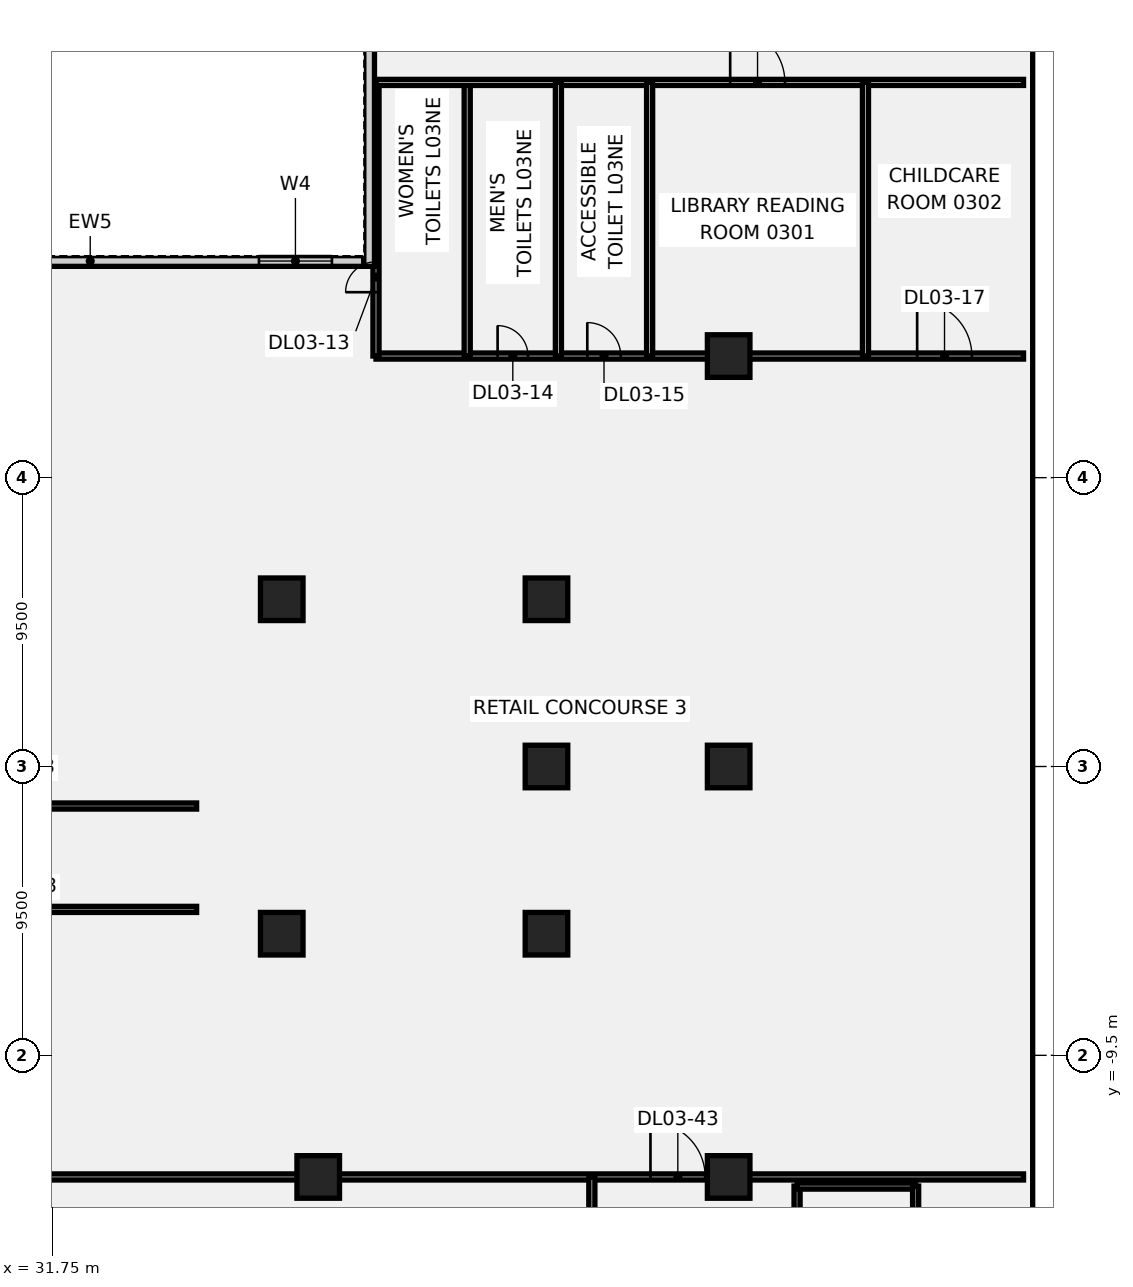
"""IFC4 building model, lengths in metres.
Left out: names, types, materials, properties, quantities, classifications, styles, units other than length and angle.
Written with IfcOpenShell. Run it as: python <this file> out.ifc"""

import sys

from ifc_helpers import new_model, si_unit, direction, frame, frame_2d, origin, origin_2d, place, context, subcontext, project, spatial, polyline, rectangle, outline, extrude, element, fill, save


model = new_model("IFC4")
c1 = context("Model", 3, precision=1e-05, world=origin(), true_north=direction((0.0, 1.0)))
c2 = subcontext(c1, "Body", "Model", "MODEL_VIEW")
j1 = project(units=[si_unit("LENGTHUNIT", "METRE"), si_unit("PLANEANGLEUNIT", "RADIAN")], contexts=[c1])
p1 = place(None, origin())
s1 = spatial("IfcSite", under=j1, at=p1, CompositionType="ELEMENT")
p2 = place(p1, origin())
s2 = spatial("IfcBuilding", under=s1, at=p2, CompositionType="ELEMENT")
p3 = place(p2, frame((0.0, 0.0, 20.0)))
s3 = spatial("IfcBuildingStorey", under=s2, at=p3, CompositionType="ELEMENT", Elevation=20.0)
for number, where, z_axis, x_axis in (
    (1, (39.3, 5.5, -0.5), (0.0, 0.0, 1.0), (1.0, 0.0, 0.0)),
    (2, (39.3, -5.5, -0.5), (0.0, 0.0, 1.0), (1.0, 0.0, 0.0)),
    (3, (48.008, -5.5, -0.5), (0.0, 0.0, 1.0), (1.0, 0.0, 0.0)),
    (4, (48.008, 0.0, -0.5), (0.0, 0.0, 1.0), (1.0, 0.0, 0.0)),
    (5, (48.008, 5.5, -0.5), (0.0, 0.0, 1.0), (1.0, 0.0, 0.0)),
    (6, (40.5, -13.5, -0.5), (0.0, 0.0, 1.0), (1.0, 0.0, 0.0)),
    (7, (54.0, -13.5, -0.5), (0.0, 0.0, 1.0), (1.0, 0.0, 0.0)),
    (8, (54.0, 0.0, -0.5), (0.0, 0.0, 1.0), (1.0, 0.0, 0.0)),
    (9, (54.0, 13.5, -0.5), (0.0, 0.0, 1.0), (1.0, 0.0, 0.0)),
):
    element("IfcColumn", number, at=place(p3, frame(where, z_axis=z_axis, x_axis=x_axis)), inside=s3, PredefinedType="COLUMN", context=c2, shape_type="SweptSolid", body=[
        extrude(rectangle(XDim=1.4, YDim=1.4, at=origin_2d()), origin(), (0.0, 0.0, 1.0), 5.05),
    ])
p4 = place(p3, frame((56.25, -25.3, 0.0), z_axis=(0.0, 0.0, 1.0), x_axis=(0.0, 1.0, 0.0)))
e10 = element("IfcWall", 10, at=p4, inside=s3, PredefinedType="PARTITIONING", context=c2, shape_type="SweptSolid", body=[
    extrude(rectangle(XDim=11.5, YDim=0.2, at=frame_2d((5.75, 0.0))), origin(), (0.0, 0.0, 1.0), 4.55),
])
p5 = place(p3, frame((56.25, -13.8, 0.0), z_axis=(0.0, 0.0, 1.0), x_axis=(1.0, 0.0, 0.0)))
e11 = element("IfcWall", 11, at=p5, inside=s3, PredefinedType="PARTITIONING", context=c2, shape_type="SweptSolid", body=[
    extrude(rectangle(XDim=3.9, YDim=0.2, at=frame_2d((1.95, 0.0))), origin(), (0.0, 0.0, 1.0), 4.55),
])
p6 = place(p3, frame((60.15, -25.3, 0.0), z_axis=(0.0, 0.0, 1.0), x_axis=(0.0, 1.0, 0.0)))
e12 = element("IfcWall", 12, at=p6, inside=s3, PredefinedType="PARTITIONING", context=c2, shape_type="SweptSolid", body=[
    extrude(rectangle(XDim=11.5, YDim=0.2, at=frame_2d((5.75, 0.0))), origin(), (0.0, 0.0, 1.0), 4.55),
])
p7 = place(p3, frame((22.5, -13.5, 0.0), z_axis=(0.0, 0.0, 1.0), x_axis=(1.0, 0.0, 0.0)))
e13 = element("IfcWall", 13, at=p7, inside=s3, PredefinedType="PARTITIONING", context=c2, shape_type="SweptSolid", body=[
    extrude(rectangle(XDim=41.199, YDim=0.2, at=frame_2d((20.6, 0.0))), origin(), (0.0, 0.0, 1.0), 4.55),
])
p8 = place(p7, frame((28.928, 0.0, 0.0)))
e14 = element("IfcOpeningElement", 14, at=p8, cuts=e13, PredefinedType="OPENING", context=c2, shape_type="SweptSolid", body=[
    extrude(rectangle(XDim=1.8, YDim=2.1, at=frame_2d((0.9, 1.05))), frame((0.0, 0.11, 0.0), z_axis=(0.0, -1.0, 0.0), x_axis=(1.0, 0.0, 0.0)), (0.0, 0.0, 1.0), 0.22),
])
p9 = place(p3, frame((42.4, 13.5, 0.0), z_axis=(0.0, 0.0, 1.0), x_axis=(1.0, 0.0, 0.0)))
e15 = element("IfcWall", 15, at=p9, inside=s3, PredefinedType="PARTITIONING", context=c2, shape_type="SweptSolid", body=[
    extrude(rectangle(XDim=21.299, YDim=0.2, at=frame_2d((10.649, 0.0))), origin(), (0.0, 0.0, 1.0), 4.55),
])
p10 = place(p9, frame((4.0, 0.0, 0.0)))
e16 = element("IfcOpeningElement", 16, at=p10, cuts=e15, PredefinedType="OPENING", context=c2, shape_type="SweptSolid", body=[
    extrude(rectangle(XDim=1.0, YDim=2.1, at=frame_2d((0.5, 1.05))), frame((0.0, 0.11, 0.0), z_axis=(0.0, -1.0, 0.0), x_axis=(1.0, 0.0, 0.0)), (0.0, 0.0, 1.0), 0.22),
])
p11 = place(p9, frame((6.95, 0.0, 0.0)))
e17 = element("IfcOpeningElement", 17, at=p11, cuts=e15, PredefinedType="OPENING", context=c2, shape_type="SweptSolid", body=[
    extrude(rectangle(XDim=1.1, YDim=2.1, at=frame_2d((0.55, 1.05))), frame((0.0, 0.11, 0.0), z_axis=(0.0, -1.0, 0.0), x_axis=(1.0, 0.0, 0.0)), (0.0, 0.0, 1.0), 0.22),
])
p12 = place(p9, frame((17.8, 0.0, 0.0)))
e18 = element("IfcOpeningElement", 18, at=p12, cuts=e15, PredefinedType="OPENING", context=c2, shape_type="SweptSolid", body=[
    extrude(rectangle(XDim=1.8, YDim=2.1, at=frame_2d((0.9, 1.05))), frame((0.0, 0.11, 0.0), z_axis=(0.0, -1.0, 0.0), x_axis=(1.0, 0.0, 0.0)), (0.0, 0.0, 1.0), 0.22),
])
p13 = place(p3, frame((45.4, 13.5, 0.0), z_axis=(0.0, 0.0, 1.0), x_axis=(0.0, 1.0, 0.0)))
e19 = element("IfcWall", 19, at=p13, inside=s3, PredefinedType="PARTITIONING", context=c2, shape_type="SweptSolid", body=[
    extrude(rectangle(XDim=9.0, YDim=0.2, at=frame_2d((4.5, 0.0))), origin(), (0.0, 0.0, 1.0), 4.55),
])
p14 = place(p3, frame((42.4, 13.5, 0.0), z_axis=(0.0, 0.0, 1.0), x_axis=(0.0, 1.0, 0.0)))
e20 = element("IfcWall", 20, at=p14, inside=s3, PredefinedType="PARTITIONING", context=c2, shape_type="SweptSolid", body=[
    extrude(rectangle(XDim=9.0, YDim=0.2, at=frame_2d((4.5, 0.0))), origin(), (0.0, 0.0, 1.0), 4.55),
])
p15 = place(p14, frame((2.1, 0.0, 0.0)))
e21 = element("IfcOpeningElement", 21, at=p15, cuts=e20, PredefinedType="OPENING", context=c2, shape_type="SweptSolid", body=[
    extrude(rectangle(XDim=1.0, YDim=2.1, at=frame_2d((0.5, 1.05))), frame((0.0, 0.11, 0.0), z_axis=(0.0, -1.0, 0.0), x_axis=(1.0, 0.0, 0.0)), (0.0, 0.0, 1.0), 0.22),
])
p16 = place(p3, frame((42.4, 22.5, 0.0), z_axis=(0.0, 0.0, 1.0), x_axis=(1.0, 0.0, 0.0)))
e22 = element("IfcWall", 22, at=p16, inside=s3, PredefinedType="PARTITIONING", context=c2, shape_type="SweptSolid", body=[
    extrude(rectangle(XDim=21.299, YDim=0.2, at=frame_2d((10.649, 0.0))), origin(), (0.0, 0.0, 1.0), 4.55),
])
p17 = place(p16, frame((11.65, 0.0, 0.0)))
e23 = element("IfcOpeningElement", 23, at=p17, cuts=e22, PredefinedType="OPENING", context=c2, shape_type="SweptSolid", body=[
    extrude(rectangle(XDim=1.8, YDim=2.1, at=frame_2d((0.9, 1.05))), frame((0.0, 0.11, 0.0), z_axis=(0.0, -1.0, 0.0), x_axis=(1.0, 0.0, 0.0)), (0.0, 0.0, 1.0), 0.22),
])
for number, where, z_axis, x_axis in (
    (24, (48.4, 13.5, 0.0), (0.0, 0.0, 1.0), (0.0, 1.0, 0.0)),
    (25, (49.5, -22.5, 0.0), (0.0, 0.0, 1.0), (0.0, 1.0, 0.0)),
    (26, (51.4, 13.5, 0.0), (0.0, 0.0, 1.0), (0.0, 1.0, 0.0)),
    (27, (58.5, 13.5, 0.0), (0.0, 0.0, 1.0), (0.0, 1.0, 0.0)),
):
    element("IfcWall", number, at=place(p3, frame(where, z_axis=z_axis, x_axis=x_axis)), inside=s3, PredefinedType="PARTITIONING", context=c2, shape_type="SweptSolid", body=[
        extrude(rectangle(XDim=9.0, YDim=0.2, at=frame_2d((4.5, 0.0))), origin(), (0.0, 0.0, 1.0), 4.55),
    ])
p18 = place(p3, frame((24.0, 16.625, 0.0), z_axis=(0.0, 0.0, 1.0), x_axis=(1.0, 0.0, 0.0)))
e28 = element("IfcWall", 28, at=p18, inside=s3, PredefinedType="SOLIDWALL", context=c2, shape_type="SweptSolid", body=[
    extrude(rectangle(XDim=18.0, YDim=0.35, at=frame_2d((9.0, 0.0))), origin(), (0.0, 0.0, 1.0), 4.55),
])
p19 = place(p18, frame((14.55, 0.0, 1.0)))
e29 = element("IfcOpeningElement", 29, at=p19, cuts=e28, PredefinedType="OPENING", context=c2, shape_type="SweptSolid", body=[
    extrude(rectangle(XDim=2.4, YDim=1.8, at=frame_2d((1.2, 0.9))), frame((0.0, 0.185, 0.0), z_axis=(0.0, -1.0, 0.0), x_axis=(1.0, 0.0, 0.0)), (0.0, 0.0, 1.0), 0.37),
])
p20 = place(p3, frame((42.175, 16.45, 0.0), z_axis=(0.0, 0.0, 1.0), x_axis=(0.0, 1.0, 0.0)))
e30 = element("IfcWall", 30, at=p20, inside=s3, PredefinedType="SOLIDWALL", context=c2, shape_type="SweptSolid", body=[
    extrude(rectangle(XDim=27.4, YDim=0.35, at=frame_2d((13.7, 0.0))), origin(), (0.0, 0.0, 1.0), 4.55),
])
p21 = place(p20, frame((15.2, 0.0, 1.0)))
e31 = element("IfcOpeningElement", 31, at=p21, cuts=e30, PredefinedType="OPENING", context=c2, shape_type="SweptSolid", body=[
    extrude(rectangle(XDim=2.4, YDim=1.8, at=frame_2d((1.2, 0.9))), frame((0.0, 0.185, 0.0), z_axis=(0.0, -1.0, 0.0), x_axis=(1.0, 0.0, 0.0)), (0.0, 0.0, 1.0), 0.37),
])
p22 = place(p3, frame((29.8, -1.3, 0.0), z_axis=(0.0, 0.0, 1.0), x_axis=(1.0, 0.0, 0.0)))
e32 = element("IfcWall", 32, at=p22, inside=s3, PredefinedType="SHEAR", context=c2, shape_type="SweptSolid", body=[
    extrude(rectangle(XDim=6.7, YDim=0.2, at=frame_2d((3.35, 0.0))), origin(), (0.0, 0.0, 1.0), 4.55),
])
p23 = place(p22, frame((0.35, 0.0, 0.0)))
e33 = element("IfcOpeningElement", 33, at=p23, cuts=e32, PredefinedType="OPENING", context=c2, shape_type="SweptSolid", body=[
    extrude(rectangle(XDim=1.0, YDim=2.1, at=frame_2d((0.5, 1.05))), frame((0.0, 0.11, 0.0), z_axis=(0.0, -1.0, 0.0), x_axis=(1.0, 0.0, 0.0)), (0.0, 0.0, 1.0), 0.22),
])
p24 = place(p3, frame((29.8, -4.7, 0.0), z_axis=(0.0, 0.0, 1.0), x_axis=(1.0, 0.0, 0.0)))
e34 = element("IfcWall", 34, at=p24, inside=s3, PredefinedType="SHEAR", context=c2, shape_type="SweptSolid", body=[
    extrude(rectangle(XDim=6.7, YDim=0.2, at=frame_2d((3.35, 0.0))), origin(), (0.0, 0.0, 1.0), 4.55),
])
p25 = place(p3, origin())
e35 = element("IfcWall", 35, at=p25, inside=s3, PredefinedType="SHEAR", context=c2, shape_type="SweptSolid", body=[
    extrude(outline(polyline([(36.3, -4.6), (36.5, -4.6), (36.5, -1.4), (36.3, -1.4), (36.3, -4.6)])), origin(), (0.0, 0.0, 1.0), 4.55),
])
p26 = place(p15, origin())
e36 = element("IfcDoor", 36, at=p26, inside=s3, OperationType="SINGLE_SWING_LEFT", PredefinedType="DOOR", context=c2, shape_type="SweptSolid", body=[
    extrude(rectangle(XDim=1.0, YDim=2.1, at=frame_2d((0.5, 1.05))), frame((0.0, 0.025, 0.0), z_axis=(0.0, -1.0, 0.0), x_axis=(1.0, 0.0, 0.0)), (0.0, 0.0, 1.0), 0.05),
])
fill(e21, e36)
p27 = place(p10, origin())
e37 = element("IfcDoor", 37, at=p27, inside=s3, OperationType="SINGLE_SWING_RIGHT", PredefinedType="DOOR", context=c2, shape_type="SweptSolid", body=[
    extrude(rectangle(XDim=1.0, YDim=2.1, at=frame_2d((0.5, 1.05))), frame((0.0, 0.025, 0.0), z_axis=(0.0, -1.0, 0.0), x_axis=(1.0, 0.0, 0.0)), (0.0, 0.0, 1.0), 0.05),
])
fill(e16, e37)
p28 = place(p11, origin())
e38 = element("IfcDoor", 38, at=p28, inside=s3, OperationType="SINGLE_SWING_LEFT", PredefinedType="DOOR", context=c2, shape_type="SweptSolid", body=[
    extrude(rectangle(XDim=1.1, YDim=2.1, at=frame_2d((0.55, 1.05))), frame((0.0, 0.025, 0.0), z_axis=(0.0, -1.0, 0.0), x_axis=(1.0, 0.0, 0.0)), (0.0, 0.0, 1.0), 0.05),
])
fill(e17, e38)
p29 = place(p17, origin())
e39 = element("IfcDoor", 39, at=p29, inside=s3, OperationType="SINGLE_SWING_RIGHT", PredefinedType="DOOR", context=c2, shape_type="SweptSolid", body=[
    extrude(rectangle(XDim=1.8, YDim=2.1, at=frame_2d((0.9, 1.05))), frame((0.0, 0.025, 0.0), z_axis=(0.0, -1.0, 0.0), x_axis=(1.0, 0.0, 0.0)), (0.0, 0.0, 1.0), 0.05),
])
fill(e23, e39)
p30 = place(p12, origin())
e40 = element("IfcDoor", 40, at=p30, inside=s3, OperationType="SINGLE_SWING_LEFT", PredefinedType="DOOR", context=c2, shape_type="SweptSolid", body=[
    extrude(rectangle(XDim=1.8, YDim=2.1, at=frame_2d((0.9, 1.05))), frame((0.0, 0.025, 0.0), z_axis=(0.0, -1.0, 0.0), x_axis=(1.0, 0.0, 0.0)), (0.0, 0.0, 1.0), 0.05),
])
fill(e18, e40)
p31 = place(p8, origin())
e41 = element("IfcDoor", 41, at=p31, inside=s3, OperationType="SINGLE_SWING_LEFT", PredefinedType="DOOR", context=c2, shape_type="SweptSolid", body=[
    extrude(rectangle(XDim=1.8, YDim=2.1, at=frame_2d((0.9, 1.05))), frame((0.0, 0.025, 0.0), z_axis=(0.0, -1.0, 0.0), x_axis=(1.0, 0.0, 0.0)), (0.0, 0.0, 1.0), 0.05),
])
fill(e14, e41)
p32 = place(p19, origin())
e42 = element("IfcWindow", 42, at=p32, inside=s3, PartitioningType="SINGLE_PANEL", PredefinedType="WINDOW", context=c2, shape_type="SweptSolid", body=[
    extrude(rectangle(XDim=2.4, YDim=1.8, at=frame_2d((1.2, 0.9))), frame((0.0, 0.03, 0.0), z_axis=(0.0, -1.0, 0.0), x_axis=(1.0, 0.0, 0.0)), (0.0, 0.0, 1.0), 0.06),
])
fill(e29, e42)
save(model, sys.argv[1])
